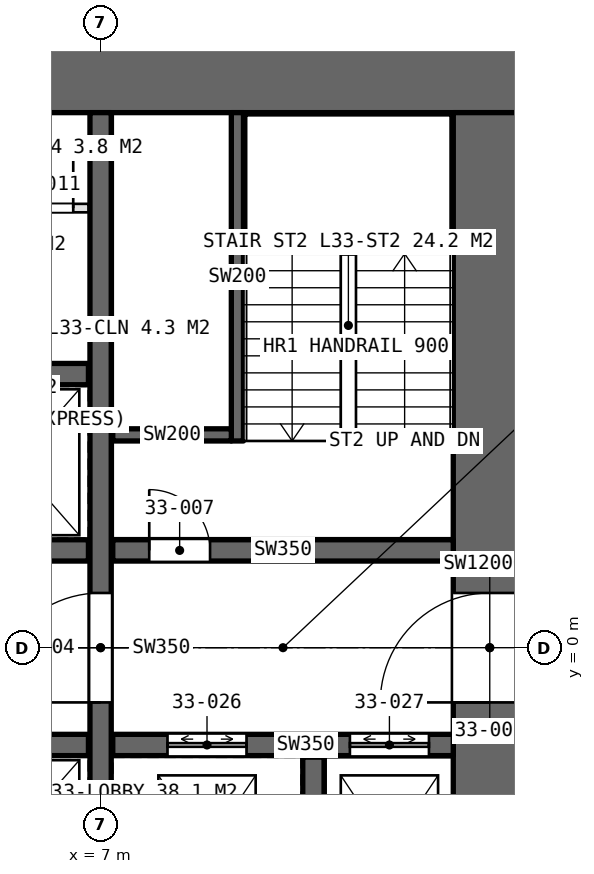
"""IFC4 building model, lengths in metres.
Left out: names, types, materials, properties, quantities, classifications, styles, units other than length and angle.
Written with IfcOpenShell. Run it as: python <this file> out.ifc"""

import sys

from ifc_helpers import new_model, si_unit, direction, frame, frame_2d, origin, place, context, subcontext, project, spatial, rectangle, extrude, element, fill, save


model = new_model("IFC4")
c1 = context("Model", 3, precision=1e-05, world=origin(), true_north=direction((0.0, 1.0)))
c2 = subcontext(c1, "Body", "Model", "MODEL_VIEW")
j1 = project(units=[si_unit("LENGTHUNIT", "METRE"), si_unit("PLANEANGLEUNIT", "RADIAN")], contexts=[c1])
p1 = place(None, origin())
s1 = spatial("IfcSite", under=j1, at=p1, CompositionType="ELEMENT")
p2 = place(p1, origin())
s2 = spatial("IfcBuilding", under=s1, at=p2, CompositionType="ELEMENT")
p3 = place(p2, frame((0.0, 0.0, 155.4)))
s3 = spatial("IfcBuildingStorey", under=s2, at=p3, CompositionType="ELEMENT", Elevation=155.4)
p4 = place(p3, frame((14.0, 9.4, 0.0), z_axis=(0.0, 0.0, 1.0), x_axis=(-1.0, 0.0, 0.0)))
e1 = element("IfcWall", 1, at=p4, inside=s3, PredefinedType="SHEAR", context=c2, shape_type="SweptSolid", body=[
    extrude(rectangle(XDim=28.0, YDim=1.2, at=frame_2d((14.0, 0.0))), origin(), (0.0, 0.0, 1.0), 4.2),
])
p5 = place(p4, frame((24.0, 0.0, 0.0)))
e2 = element("IfcOpeningElement", 2, at=p5, cuts=e1, PredefinedType="OPENING", context=c2, shape_type="SweptSolid", body=[
    extrude(rectangle(XDim=1.0, YDim=2.4, at=frame_2d((0.5, 1.2))), frame((0.0, 0.61, 0.0), z_axis=(0.0, -1.0, 0.0), x_axis=(1.0, 0.0, 0.0)), (0.0, 0.0, 1.0), 1.22),
])
p6 = place(p4, frame((13.1, 0.0, 0.0)))
e3 = element("IfcOpeningElement", 3, at=p6, cuts=e1, PredefinedType="OPENING", context=c2, shape_type="SweptSolid", body=[
    extrude(rectangle(XDim=1.8, YDim=2.4, at=frame_2d((0.9, 1.2))), frame((0.0, 0.61, 0.0), z_axis=(0.0, -1.0, 0.0), x_axis=(1.0, 0.0, 0.0)), (0.0, 0.0, 1.0), 1.22),
])
p7 = place(p3, frame((13.4, -8.8, 0.0), z_axis=(0.0, 0.0, 1.0), x_axis=(0.0, 1.0, 0.0)))
e4 = element("IfcWall", 4, at=p7, inside=s3, PredefinedType="SHEAR", context=c2, shape_type="SweptSolid", body=[
    extrude(rectangle(XDim=17.6, YDim=1.2, at=frame_2d((8.8, 0.0))), origin(), (0.0, 0.0, 1.0), 4.2),
])
p8 = place(p7, frame((7.9, 0.0, 0.0)))
e5 = element("IfcOpeningElement", 5, at=p8, cuts=e4, PredefinedType="OPENING", context=c2, shape_type="SweptSolid", body=[
    extrude(rectangle(XDim=1.8, YDim=2.4, at=frame_2d((0.9, 1.2))), frame((0.0, 0.61, 0.0), z_axis=(0.0, -1.0, 0.0), x_axis=(1.0, 0.0, 0.0)), (0.0, 0.0, 1.0), 1.22),
])
p9 = place(p3, frame((7.0, -8.8, 0.0), z_axis=(0.0, 0.0, 1.0), x_axis=(0.0, 1.0, 0.0)))
e6 = element("IfcWall", 6, at=p9, inside=s3, PredefinedType="SHEAR", context=c2, shape_type="SweptSolid", body=[
    extrude(rectangle(XDim=17.6, YDim=0.35, at=frame_2d((8.8, 0.0))), origin(), (0.0, 0.0, 1.0), 4.2),
])
p10 = place(p9, frame((7.9, 0.0, 0.0)))
e7 = element("IfcOpeningElement", 7, at=p10, cuts=e6, PredefinedType="OPENING", context=c2, shape_type="SweptSolid", body=[
    extrude(rectangle(XDim=1.8, YDim=2.4, at=frame_2d((0.9, 1.2))), frame((0.0, 0.185, 0.0), z_axis=(0.0, -1.0, 0.0), x_axis=(1.0, 0.0, 0.0)), (0.0, 0.0, 1.0), 0.37),
])
p11 = place(p3, frame((-6.8, 1.6, 0.0), z_axis=(0.0, 0.0, 1.0), x_axis=(1.0, 0.0, 0.0)))
e8 = element("IfcWall", 8, at=p11, inside=s3, PredefinedType="SHEAR", context=c2, shape_type="SweptSolid", body=[
    extrude(rectangle(XDim=13.6, YDim=0.35, at=frame_2d((6.8, 0.0))), origin(), (0.0, 0.0, 1.0), 4.2),
])
p12 = place(p11, frame((0.365, 0.0, 0.0)))
e9 = element("IfcOpeningElement", 9, at=p12, cuts=e8, PredefinedType="OPENING", context=c2, shape_type="SweptSolid", body=[
    extrude(rectangle(XDim=1.0, YDim=2.4, at=frame_2d((0.5, 1.2))), frame((0.0, 0.185, 0.0), z_axis=(0.0, -1.0, 0.0), x_axis=(1.0, 0.0, 0.0)), (0.0, 0.0, 1.0), 0.37),
])
p13 = place(p11, frame((3.2, 0.0, 0.0)))
e10 = element("IfcOpeningElement", 10, at=p13, cuts=e8, PredefinedType="OPENING", context=c2, shape_type="SweptSolid", body=[
    extrude(rectangle(XDim=1.0, YDim=2.4, at=frame_2d((0.5, 1.2))), frame((0.0, 0.185, 0.0), z_axis=(0.0, -1.0, 0.0), x_axis=(1.0, 0.0, 0.0)), (0.0, 0.0, 1.0), 0.37),
])
p14 = place(p11, frame((6.9, 0.0, 0.0)))
e11 = element("IfcOpeningElement", 11, at=p14, cuts=e8, PredefinedType="OPENING", context=c2, shape_type="SweptSolid", body=[
    extrude(rectangle(XDim=1.0, YDim=2.4, at=frame_2d((0.5, 1.2))), frame((0.0, 0.185, 0.0), z_axis=(0.0, -1.0, 0.0), x_axis=(1.0, 0.0, 0.0)), (0.0, 0.0, 1.0), 0.37),
])
p15 = place(p11, frame((9.585, 0.0, 0.0)))
e12 = element("IfcOpeningElement", 12, at=p15, cuts=e8, PredefinedType="OPENING", context=c2, shape_type="SweptSolid", body=[
    extrude(rectangle(XDim=0.9, YDim=2.4, at=frame_2d((0.45, 1.2))), frame((0.0, 0.185, 0.0), z_axis=(0.0, -1.0, 0.0), x_axis=(1.0, 0.0, 0.0)), (0.0, 0.0, 1.0), 0.37),
])
p16 = place(p3, frame((-6.8, -1.6, 0.0), z_axis=(0.0, 0.0, 1.0), x_axis=(1.0, 0.0, 0.0)))
e13 = element("IfcWall", 13, at=p16, inside=s3, PredefinedType="SHEAR", context=c2, shape_type="SweptSolid", body=[
    extrude(rectangle(XDim=13.6, YDim=0.35, at=frame_2d((6.8, 0.0))), origin(), (0.0, 0.0, 1.0), 4.2),
])
p17 = place(p16, frame((0.7, 0.0, 0.0)))
e14 = element("IfcOpeningElement", 14, at=p17, cuts=e13, PredefinedType="OPENING", context=c2, shape_type="SweptSolid", body=[
    extrude(rectangle(XDim=1.1, YDim=2.4, at=frame_2d((0.55, 1.2))), frame((0.0, 0.185, 0.0), z_axis=(0.0, -1.0, 0.0), x_axis=(1.0, 0.0, 0.0)), (0.0, 0.0, 1.0), 0.37),
])
p18 = place(p16, frame((3.5, 0.0, 0.0)))
e15 = element("IfcOpeningElement", 15, at=p18, cuts=e13, PredefinedType="OPENING", context=c2, shape_type="SweptSolid", body=[
    extrude(rectangle(XDim=1.1, YDim=2.4, at=frame_2d((0.55, 1.2))), frame((0.0, 0.185, 0.0), z_axis=(0.0, -1.0, 0.0), x_axis=(1.0, 0.0, 0.0)), (0.0, 0.0, 1.0), 0.37),
])
p19 = place(p16, frame((6.3, 0.0, 0.0)))
e16 = element("IfcOpeningElement", 16, at=p19, cuts=e13, PredefinedType="OPENING", context=c2, shape_type="SweptSolid", body=[
    extrude(rectangle(XDim=1.1, YDim=2.4, at=frame_2d((0.55, 1.2))), frame((0.0, 0.185, 0.0), z_axis=(0.0, -1.0, 0.0), x_axis=(1.0, 0.0, 0.0)), (0.0, 0.0, 1.0), 0.37),
])
p20 = place(p16, frame((9.1, 0.0, 0.0)))
e17 = element("IfcOpeningElement", 17, at=p20, cuts=e13, PredefinedType="OPENING", context=c2, shape_type="SweptSolid", body=[
    extrude(rectangle(XDim=1.1, YDim=2.4, at=frame_2d((0.55, 1.2))), frame((0.0, 0.185, 0.0), z_axis=(0.0, -1.0, 0.0), x_axis=(1.0, 0.0, 0.0)), (0.0, 0.0, 1.0), 0.37),
])
p21 = place(p3, frame((-6.8, 4.5, 0.0), z_axis=(0.0, 0.0, 1.0), x_axis=(1.0, 0.0, 0.0)))
e18 = element("IfcWall", 18, at=p21, inside=s3, PredefinedType="SHEAR", context=c2, shape_type="SweptSolid", body=[
    extrude(rectangle(XDim=13.6, YDim=0.35, at=frame_2d((6.8, 0.0))), origin(), (0.0, 0.0, 1.0), 4.2),
])
p22 = place(p3, frame((7.2, 1.6, 0.0), z_axis=(0.0, 0.0, 1.0), x_axis=(1.0, 0.0, 0.0)))
e19 = element("IfcWall", 19, at=p22, inside=s3, PredefinedType="SHEAR", context=c2, shape_type="SweptSolid", body=[
    extrude(rectangle(XDim=5.6, YDim=0.35, at=frame_2d((2.8, 0.0))), origin(), (0.0, 0.0, 1.0), 4.2),
])
p23 = place(p22, frame((0.6, 0.0, 0.0)))
e20 = element("IfcOpeningElement", 20, at=p23, cuts=e19, PredefinedType="OPENING", context=c2, shape_type="SweptSolid", body=[
    extrude(rectangle(XDim=1.0, YDim=2.4, at=frame_2d((0.5, 1.2))), frame((0.0, 0.185, 0.0), z_axis=(0.0, -1.0, 0.0), x_axis=(1.0, 0.0, 0.0)), (0.0, 0.0, 1.0), 0.37),
])
p24 = place(p3, frame((7.2, -1.6, 0.0), z_axis=(0.0, 0.0, 1.0), x_axis=(1.0, 0.0, 0.0)))
e21 = element("IfcWall", 21, at=p24, inside=s3, PredefinedType="SHEAR", context=c2, shape_type="SweptSolid", body=[
    extrude(rectangle(XDim=5.6, YDim=0.35, at=frame_2d((2.8, 0.0))), origin(), (0.0, 0.0, 1.0), 4.2),
])
p25 = place(p24, frame((0.9, 0.0, 0.0)))
e22 = element("IfcOpeningElement", 22, at=p25, cuts=e21, PredefinedType="OPENING", context=c2, shape_type="SweptSolid", body=[
    extrude(rectangle(XDim=1.3, YDim=2.4, at=frame_2d((0.65, 1.2))), frame((0.0, 0.185, 0.0), z_axis=(0.0, -1.0, 0.0), x_axis=(1.0, 0.0, 0.0)), (0.0, 0.0, 1.0), 0.37),
])
p26 = place(p24, frame((3.9, 0.0, 0.0)))
e23 = element("IfcOpeningElement", 23, at=p26, cuts=e21, PredefinedType="OPENING", context=c2, shape_type="SweptSolid", body=[
    extrude(rectangle(XDim=1.3, YDim=2.4, at=frame_2d((0.65, 1.2))), frame((0.0, 0.185, 0.0), z_axis=(0.0, -1.0, 0.0), x_axis=(1.0, 0.0, 0.0)), (0.0, 0.0, 1.0), 0.37),
])
p27 = place(p3, frame((10.5, -4.8, 0.0), z_axis=(0.0, 0.0, 1.0), x_axis=(0.0, 1.0, 0.0)))
e24 = element("IfcWall", 24, at=p27, inside=s3, PredefinedType="SHEAR", context=c2, shape_type="SweptSolid", body=[
    extrude(rectangle(XDim=3.0, YDim=0.35, at=frame_2d((1.5, 0.0))), origin(), (0.0, 0.0, 1.0), 4.2),
])
p28 = place(p3, frame((-6.8, 7.23, 0.0), z_axis=(0.0, 0.0, 1.0), x_axis=(1.0, 0.0, 0.0)))
e25 = element("IfcWall", 25, at=p28, inside=s3, PredefinedType="PARTITIONING", context=c2, shape_type="SweptSolid", body=[
    extrude(rectangle(XDim=13.6, YDim=0.14, at=frame_2d((6.8, 0.0))), origin(), (0.0, 0.0, 1.0), 3.95),
])
p29 = place(p28, frame((3.48, 0.0, 0.0)))
e26 = element("IfcOpeningElement", 26, at=p29, cuts=e25, PredefinedType="OPENING", context=c2, shape_type="SweptSolid", body=[
    extrude(rectangle(XDim=1.0, YDim=2.4, at=frame_2d((0.5, 1.2))), frame((0.0, 0.08, 0.0), z_axis=(0.0, -1.0, 0.0), x_axis=(1.0, 0.0, 0.0)), (0.0, 0.0, 1.0), 0.16),
])
p30 = place(p28, frame((7.98, 0.0, 0.0)))
e27 = element("IfcOpeningElement", 27, at=p30, cuts=e25, PredefinedType="OPENING", context=c2, shape_type="SweptSolid", body=[
    extrude(rectangle(XDim=1.0, YDim=2.4, at=frame_2d((0.5, 1.2))), frame((0.0, 0.08, 0.0), z_axis=(0.0, -1.0, 0.0), x_axis=(1.0, 0.0, 0.0)), (0.0, 0.0, 1.0), 0.16),
])
p31 = place(p28, frame((10.38, 0.0, 0.0)))
e28 = element("IfcOpeningElement", 28, at=p31, cuts=e25, PredefinedType="OPENING", context=c2, shape_type="SweptSolid", body=[
    extrude(rectangle(XDim=1.1, YDim=2.4, at=frame_2d((0.55, 1.2))), frame((0.0, 0.08, 0.0), z_axis=(0.0, -1.0, 0.0), x_axis=(1.0, 0.0, 0.0)), (0.0, 0.0, 1.0), 0.16),
])
p32 = place(p28, frame((12.45, 0.0, 0.0)))
e29 = element("IfcOpeningElement", 29, at=p32, cuts=e25, PredefinedType="OPENING", context=c2, shape_type="SweptSolid", body=[
    extrude(rectangle(XDim=0.9, YDim=2.4, at=frame_2d((0.45, 1.2))), frame((0.0, 0.08, 0.0), z_axis=(0.0, -1.0, 0.0), x_axis=(1.0, 0.0, 0.0)), (0.0, 0.0, 1.0), 0.16),
])
p33 = place(p3, frame((9.25, 3.4, 0.0), z_axis=(0.0, 0.0, 1.0), x_axis=(0.0, 1.0, 0.0)))
e30 = element("IfcWall", 30, at=p33, inside=s3, PredefinedType="SOLIDWALL", context=c2, shape_type="SweptSolid", body=[
    extrude(rectangle(XDim=5.4, YDim=0.2, at=frame_2d((2.7, 0.0))), origin(), (0.0, 0.0, 1.0), 4.2),
])
p34 = place(p3, frame((9.15, 3.5, 0.0), z_axis=(0.0, 0.0, 1.0), x_axis=(-1.0, 0.0, 0.0)))
e31 = element("IfcWall", 31, at=p34, inside=s3, PredefinedType="SOLIDWALL", context=c2, shape_type="SweptSolid", body=[
    extrude(rectangle(XDim=1.95, YDim=0.2, at=frame_2d((0.975, 0.0))), origin(), (0.0, 0.0, 1.0), 4.2),
])
p35 = place(p8, origin())
e32 = element("IfcDoor", 32, at=p35, inside=s3, OperationType="DOUBLE_DOOR_SINGLE_SWING", PredefinedType="DOOR", context=c2, shape_type="SweptSolid", body=[
    extrude(rectangle(XDim=1.8, YDim=2.4, at=frame_2d((0.9, 1.2))), frame((0.0, 0.025, 0.0), z_axis=(0.0, -1.0, 0.0), x_axis=(1.0, 0.0, 0.0)), (0.0, 0.0, 1.0), 0.05),
])
fill(e5, e32)
p36 = place(p10, origin())
e33 = element("IfcDoor", 33, at=p36, inside=s3, OperationType="DOUBLE_DOOR_SINGLE_SWING", PredefinedType="DOOR", context=c2, shape_type="SweptSolid", body=[
    extrude(rectangle(XDim=1.8, YDim=2.4, at=frame_2d((0.9, 1.2))), frame((0.0, 0.025, 0.0), z_axis=(0.0, -1.0, 0.0), x_axis=(1.0, 0.0, 0.0)), (0.0, 0.0, 1.0), 0.05),
])
fill(e7, e33)
p37 = place(p23, origin())
e34 = element("IfcDoor", 34, at=p37, inside=s3, OperationType="SINGLE_SWING_LEFT", PredefinedType="DOOR", context=c2, shape_type="SweptSolid", body=[
    extrude(rectangle(XDim=1.0, YDim=2.4, at=frame_2d((0.5, 1.2))), frame((0.0, 0.025, 0.0), z_axis=(0.0, -1.0, 0.0), x_axis=(1.0, 0.0, 0.0)), (0.0, 0.0, 1.0), 0.05),
])
fill(e20, e34)
p38 = place(p32, origin())
e35 = element("IfcDoor", 35, at=p38, inside=s3, OperationType="SINGLE_SWING_RIGHT", PredefinedType="DOOR", context=c2, shape_type="SweptSolid", body=[
    extrude(rectangle(XDim=0.9, YDim=2.4, at=frame_2d((0.45, 1.2))), frame((0.0, 0.025, 0.0), z_axis=(0.0, -1.0, 0.0), x_axis=(1.0, 0.0, 0.0)), (0.0, 0.0, 1.0), 0.05),
])
fill(e29, e35)
p39 = place(p25, origin())
e36 = element("IfcDoor", 36, at=p39, inside=s3, OperationType="DOUBLE_DOOR_SLIDING", PredefinedType="DOOR", context=c2, shape_type="SweptSolid", body=[
    extrude(rectangle(XDim=1.3, YDim=2.4, at=frame_2d((0.65, 1.2))), frame((0.0, 0.025, 0.0), z_axis=(0.0, -1.0, 0.0), x_axis=(1.0, 0.0, 0.0)), (0.0, 0.0, 1.0), 0.05),
])
fill(e22, e36)
p40 = place(p26, origin())
e37 = element("IfcDoor", 37, at=p40, inside=s3, OperationType="DOUBLE_DOOR_SLIDING", PredefinedType="DOOR", context=c2, shape_type="SweptSolid", body=[
    extrude(rectangle(XDim=1.3, YDim=2.4, at=frame_2d((0.65, 1.2))), frame((0.0, 0.025, 0.0), z_axis=(0.0, -1.0, 0.0), x_axis=(1.0, 0.0, 0.0)), (0.0, 0.0, 1.0), 0.05),
])
fill(e23, e37)
save(model, sys.argv[1])
